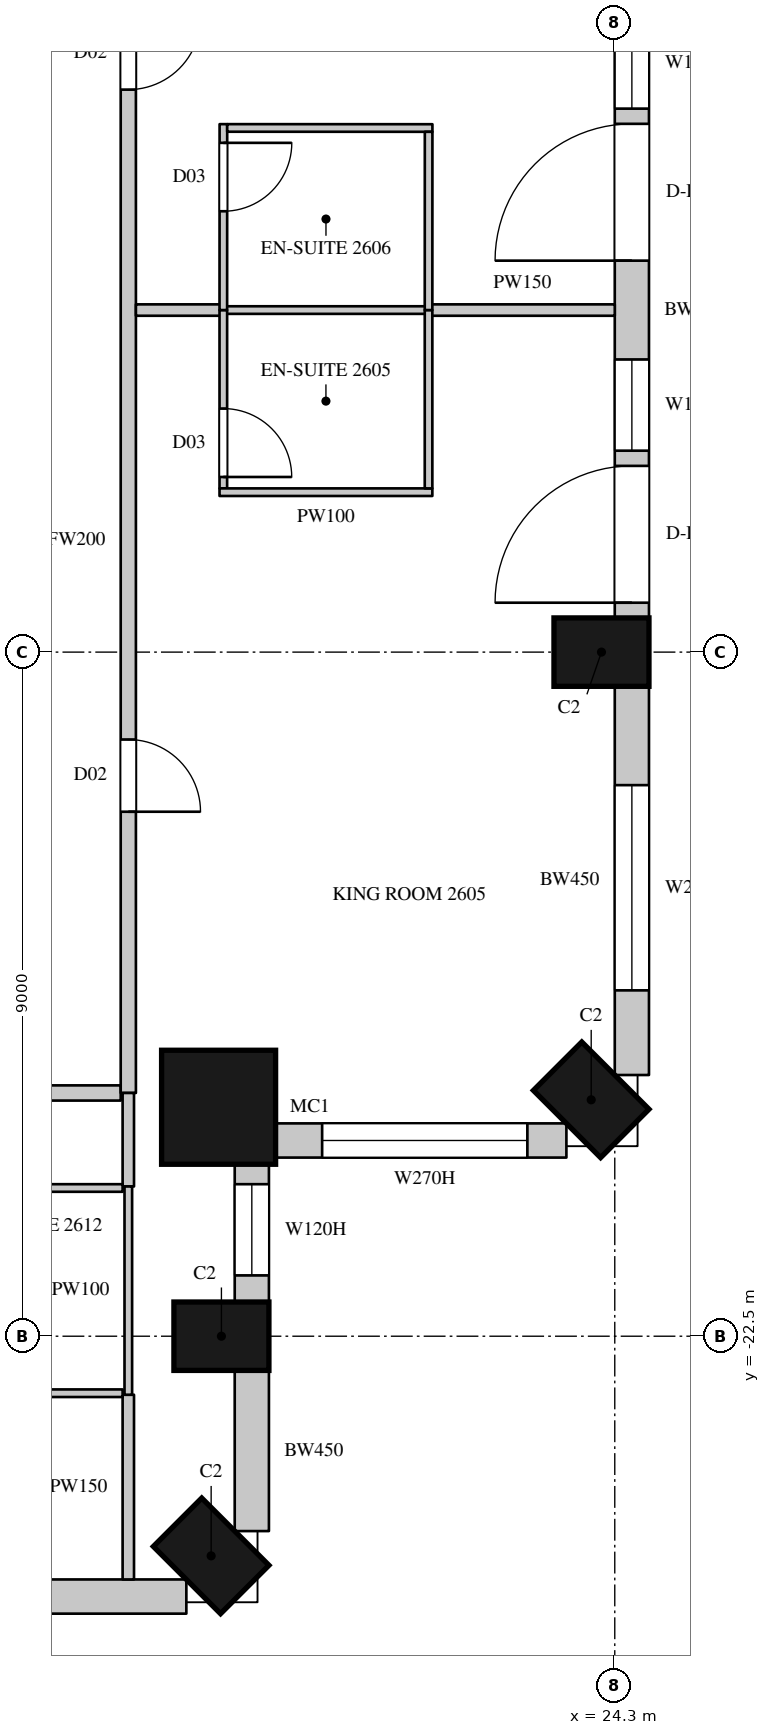
"""IFC4 building model, lengths in metres.
Left out: names, types, materials, properties, quantities, classifications, styles, units other than length and angle.
Written with IfcOpenShell. Run it as: python <this file> out.ifc"""

import sys

from ifc_helpers import new_model, si_unit, direction, frame, frame_2d, origin, origin_2d, place, context, subcontext, project, spatial, rectangle, circle, extrude, element, fill, save


model = new_model("IFC4")
c1 = context("Model", 3, precision=1e-05, world=origin(), true_north=direction((0.0, 1.0)))
c2 = subcontext(c1, "Body", "Model", "MODEL_VIEW")
j1 = project(units=[si_unit("LENGTHUNIT", "METRE"), si_unit("PLANEANGLEUNIT", "RADIAN")], contexts=[c1])
p1 = place(None, origin())
s1 = spatial("IfcSite", under=j1, at=p1, CompositionType="ELEMENT")
p2 = place(p1, origin())
s2 = spatial("IfcBuilding", under=s1, at=p2, CompositionType="ELEMENT")
p3 = place(p2, frame((0.0, 0.0, 123.9)))
s3 = spatial("IfcBuildingStorey", under=s2, at=p3, CompositionType="ELEMENT", Elevation=123.9)
for number, where, z_axis, x_axis in (
    (1, (18.99, -25.39, 0.0), (0.0, 0.0, 1.0), (0.707, 0.707, 0.0)),
    (2, (19.125, -22.5, 0.0), (0.0, 0.0, 1.0), (0.0, 1.0, 0.0)),
):
    element("IfcColumn", number, at=place(p3, frame(where, z_axis=z_axis, x_axis=x_axis)), inside=s3, PredefinedType="COLUMN", context=c2, shape_type="SweptSolid", body=[
        extrude(rectangle(XDim=0.9, YDim=1.25, at=origin_2d()), origin(), (0.0, 0.0, 1.0), 3.6),
    ])
p4 = place(p3, frame((19.088, -19.488, 0.0), z_axis=(0.0, 0.0, 1.0), x_axis=(1.0, 0.0, 0.0)))
e3 = element("IfcColumn", 3, at=p4, inside=s3, PredefinedType="COLUMN", context=c2, shape_type="SweptSolid", body=[
    extrude(circle(Radius=0.75, at=origin_2d()), origin(), (0.0, 0.0, 1.0), 3.6),
])
for number, where, z_axis, x_axis in (
    (4, (23.99, -19.39, 0.0), (0.0, 0.0, 1.0), (0.707, 0.707, 0.0)),
    (5, (24.125, -13.5, 0.0), (0.0, 0.0, 1.0), (0.0, 1.0, 0.0)),
):
    element("IfcColumn", number, at=place(p3, frame(where, z_axis=z_axis, x_axis=x_axis)), inside=s3, PredefinedType="COLUMN", context=c2, shape_type="SweptSolid", body=[
        extrude(rectangle(XDim=0.9, YDim=1.25, at=origin_2d()), origin(), (0.0, 0.0, 1.0), 3.6),
    ])
p5 = place(p3, frame((15.75, -25.925, 0.0), z_axis=(0.0, 0.0, 1.0), x_axis=(1.0, 0.0, 0.0)))
e6 = element("IfcWall", 6, at=p5, inside=s3, PredefinedType="SOLIDWALL", context=c2, shape_type="SweptSolid", body=[
    extrude(rectangle(XDim=2.914, YDim=0.45, at=frame_2d((1.457, 0.0))), origin(), (0.0, 0.0, 1.0), 3.3),
])
p6 = place(p3, frame((19.525, -25.064, 0.0), z_axis=(0.0, 0.0, 1.0), x_axis=(0.0, 1.0, 0.0)))
e7 = element("IfcWall", 7, at=p6, inside=s3, PredefinedType="SOLIDWALL", context=c2, shape_type="SweptSolid", body=[
    extrude(rectangle(XDim=2.114, YDim=0.45, at=frame_2d((1.057, 0.0))), origin(), (0.0, 0.0, 1.0), 3.3),
])
p7 = place(p3, frame((19.525, -22.05, 0.0), z_axis=(0.0, 0.0, 1.0), x_axis=(0.0, 1.0, 0.0)))
e8 = element("IfcWall", 8, at=p7, inside=s3, PredefinedType="SOLIDWALL", context=c2, shape_type="SweptSolid", body=[
    extrude(rectangle(XDim=1.843, YDim=0.45, at=frame_2d((0.921, 0.0))), origin(), (0.0, 0.0, 1.0), 3.3),
])
p8 = place(p7, frame((0.35, 0.0, 1.05)))
e9 = element("IfcOpeningElement", 9, at=p8, cuts=e8, PredefinedType="OPENING", context=c2, shape_type="SweptSolid", body=[
    extrude(rectangle(XDim=1.2, YDim=2.0, at=frame_2d((0.6, 1.0))), frame((0.0, 0.235, 0.0), z_axis=(0.0, -1.0, 0.0), x_axis=(1.0, 0.0, 0.0)), (0.0, 0.0, 1.0), 0.47),
])
p9 = place(p3, frame((19.807, -19.925, 0.0), z_axis=(0.0, 0.0, 1.0), x_axis=(1.0, 0.0, 0.0)))
e10 = element("IfcWall", 10, at=p9, inside=s3, PredefinedType="SOLIDWALL", context=c2, shape_type="SweptSolid", body=[
    extrude(rectangle(XDim=3.857, YDim=0.45, at=frame_2d((1.928, 0.0))), origin(), (0.0, 0.0, 1.0), 3.3),
])
p10 = place(p9, frame((0.643, 0.0, 1.05)))
e11 = element("IfcOpeningElement", 11, at=p10, cuts=e10, PredefinedType="OPENING", context=c2, shape_type="SweptSolid", body=[
    extrude(rectangle(XDim=2.7, YDim=2.0, at=frame_2d((1.35, 1.0))), frame((0.0, 0.235, 0.0), z_axis=(0.0, -1.0, 0.0), x_axis=(1.0, 0.0, 0.0)), (0.0, 0.0, 1.0), 0.47),
])
p11 = place(p3, frame((24.525, -19.064, 0.0), z_axis=(0.0, 0.0, 1.0), x_axis=(0.0, 1.0, 0.0)))
e12 = element("IfcWall", 12, at=p11, inside=s3, PredefinedType="SOLIDWALL", context=c2, shape_type="SweptSolid", body=[
    extrude(rectangle(XDim=5.114, YDim=0.45, at=frame_2d((2.557, 0.0))), origin(), (0.0, 0.0, 1.0), 3.3),
])
p12 = place(p11, frame((1.114, 0.0, 1.05)))
e13 = element("IfcOpeningElement", 13, at=p12, cuts=e12, PredefinedType="OPENING", context=c2, shape_type="SweptSolid", body=[
    extrude(rectangle(XDim=2.7, YDim=2.0, at=frame_2d((1.35, 1.0))), frame((0.0, 0.235, 0.0), z_axis=(0.0, -1.0, 0.0), x_axis=(1.0, 0.0, 0.0)), (0.0, 0.0, 1.0), 0.47),
])
p13 = place(p3, frame((24.525, -13.05, 0.0), z_axis=(0.0, 0.0, 1.0), x_axis=(0.0, 1.0, 0.0)))
e14 = element("IfcWall", 14, at=p13, inside=s3, PredefinedType="SOLIDWALL", context=c2, shape_type="SweptSolid", body=[
    extrude(rectangle(XDim=8.1, YDim=0.45, at=frame_2d((4.05, 0.0))), origin(), (0.0, 0.0, 1.0), 3.3),
])
p14 = place(p13, frame((0.2, 0.0, 0.0)))
e15 = element("IfcOpeningElement", 15, at=p14, cuts=e14, PredefinedType="OPENING", context=c2, shape_type="SweptSolid", body=[
    extrude(rectangle(XDim=1.8, YDim=2.4, at=frame_2d((0.9, 1.2))), frame((0.0, 0.235, 0.0), z_axis=(0.0, -1.0, 0.0), x_axis=(1.0, 0.0, 0.0)), (0.0, 0.0, 1.0), 0.47),
])
p15 = place(p13, frame((2.2, 0.0, 1.05)))
e16 = element("IfcOpeningElement", 16, at=p15, cuts=e14, PredefinedType="OPENING", context=c2, shape_type="SweptSolid", body=[
    extrude(rectangle(XDim=1.2, YDim=2.0, at=frame_2d((0.6, 1.0))), frame((0.0, 0.235, 0.0), z_axis=(0.0, -1.0, 0.0), x_axis=(1.0, 0.0, 0.0)), (0.0, 0.0, 1.0), 0.47),
])
p16 = place(p13, frame((4.7, 0.0, 0.0)))
e17 = element("IfcOpeningElement", 17, at=p16, cuts=e14, PredefinedType="OPENING", context=c2, shape_type="SweptSolid", body=[
    extrude(rectangle(XDim=1.8, YDim=2.4, at=frame_2d((0.9, 1.2))), frame((0.0, 0.235, 0.0), z_axis=(0.0, -1.0, 0.0), x_axis=(1.0, 0.0, 0.0)), (0.0, 0.0, 1.0), 0.47),
])
p17 = place(p13, frame((6.7, 0.0, 1.05)))
e18 = element("IfcOpeningElement", 18, at=p17, cuts=e14, PredefinedType="OPENING", context=c2, shape_type="SweptSolid", body=[
    extrude(rectangle(XDim=1.2, YDim=2.0, at=frame_2d((0.6, 1.0))), frame((0.0, 0.235, 0.0), z_axis=(0.0, -1.0, 0.0), x_axis=(1.0, 0.0, 0.0)), (0.0, 0.0, 1.0), 0.47),
])
p18 = place(p3, frame((-20.8, -19.3, 0.0), z_axis=(0.0, 0.0, 1.0), x_axis=(1.0, 0.0, 0.0)))
e19 = element("IfcWall", 19, at=p18, inside=s3, PredefinedType="PARTITIONING", context=c2, shape_type="SweptSolid", body=[
    extrude(rectangle(XDim=38.6, YDim=0.2, at=frame_2d((19.3, 0.0))), origin(), (0.0, 0.0, 1.0), 3.3),
])
p19 = place(p18, frame((11.2, 0.0, 0.0)))
e20 = element("IfcOpeningElement", 20, at=p19, cuts=e19, PredefinedType="OPENING", context=c2, shape_type="SweptSolid", body=[
    extrude(rectangle(XDim=0.95, YDim=2.2, at=frame_2d((0.475, 1.1))), frame((0.0, 0.11, 0.0), z_axis=(0.0, -1.0, 0.0), x_axis=(1.0, 0.0, 0.0)), (0.0, 0.0, 1.0), 0.22),
])
p20 = place(p18, frame((15.05, 0.0, 0.0)))
e21 = element("IfcOpeningElement", 21, at=p20, cuts=e19, PredefinedType="OPENING", context=c2, shape_type="SweptSolid", body=[
    extrude(rectangle(XDim=0.95, YDim=2.2, at=frame_2d((0.475, 1.1))), frame((0.0, 0.11, 0.0), z_axis=(0.0, -1.0, 0.0), x_axis=(1.0, 0.0, 0.0)), (0.0, 0.0, 1.0), 0.22),
])
p21 = place(p18, frame((29.2, 0.0, 0.0)))
e22 = element("IfcOpeningElement", 22, at=p21, cuts=e19, PredefinedType="OPENING", context=c2, shape_type="SweptSolid", body=[
    extrude(rectangle(XDim=0.95, YDim=2.2, at=frame_2d((0.475, 1.1))), frame((0.0, 0.11, 0.0), z_axis=(0.0, -1.0, 0.0), x_axis=(1.0, 0.0, 0.0)), (0.0, 0.0, 1.0), 0.22),
])
p22 = place(p18, frame((33.05, 0.0, 0.0)))
e23 = element("IfcOpeningElement", 23, at=p22, cuts=e19, PredefinedType="OPENING", context=c2, shape_type="SweptSolid", body=[
    extrude(rectangle(XDim=0.95, YDim=2.2, at=frame_2d((0.475, 1.1))), frame((0.0, 0.11, 0.0), z_axis=(0.0, -1.0, 0.0), x_axis=(1.0, 0.0, 0.0)), (0.0, 0.0, 1.0), 0.22),
])
p23 = place(p3, frame((17.9, -19.3, 0.0), z_axis=(0.0, 0.0, 1.0), x_axis=(0.0, 1.0, 0.0)))
e24 = element("IfcWall", 24, at=p23, inside=s3, PredefinedType="PARTITIONING", context=c2, shape_type="SweptSolid", body=[
    extrude(rectangle(XDim=14.55, YDim=0.2, at=frame_2d((7.275, 0.0))), origin(), (0.0, 0.0, 1.0), 3.3),
])
p24 = place(p23, frame((3.7, 0.0, 0.0)))
e25 = element("IfcOpeningElement", 25, at=p24, cuts=e24, PredefinedType="OPENING", context=c2, shape_type="SweptSolid", body=[
    extrude(rectangle(XDim=0.95, YDim=2.2, at=frame_2d((0.475, 1.1))), frame((0.0, 0.11, 0.0), z_axis=(0.0, -1.0, 0.0), x_axis=(1.0, 0.0, 0.0)), (0.0, 0.0, 1.0), 0.22),
])
p25 = place(p23, frame((13.2, 0.0, 0.0)))
e26 = element("IfcOpeningElement", 26, at=p25, cuts=e24, PredefinedType="OPENING", context=c2, shape_type="SweptSolid", body=[
    extrude(rectangle(XDim=0.95, YDim=2.2, at=frame_2d((0.475, 1.1))), frame((0.0, 0.11, 0.0), z_axis=(0.0, -1.0, 0.0), x_axis=(1.0, 0.0, 0.0)), (0.0, 0.0, 1.0), 0.22),
])
p26 = place(p3, frame((17.9, -25.7, 0.0), z_axis=(0.0, 0.0, 1.0), x_axis=(0.0, 1.0, 0.0)))
e27 = element("IfcWall", 27, at=p26, inside=s3, PredefinedType="PARTITIONING", context=c2, shape_type="SweptSolid", body=[
    extrude(rectangle(XDim=2.43, YDim=0.15, at=frame_2d((1.215, 0.0))), origin(), (0.0, 0.0, 1.0), 3.3),
])
p27 = place(p3, frame((17.9, -20.53, 0.0), z_axis=(0.0, 0.0, 1.0), x_axis=(0.0, 1.0, 0.0)))
e28 = element("IfcWall", 28, at=p27, inside=s3, PredefinedType="PARTITIONING", context=c2, shape_type="SweptSolid", body=[
    extrude(rectangle(XDim=1.23, YDim=0.15, at=frame_2d((0.615, 0.0))), origin(), (0.0, 0.0, 1.0), 3.3),
])
p28 = place(p3, frame((18.0, -9.0, 0.0), z_axis=(0.0, 0.0, 1.0), x_axis=(1.0, 0.0, 0.0)))
e29 = element("IfcWall", 29, at=p28, inside=s3, PredefinedType="PARTITIONING", context=c2, shape_type="SweptSolid", body=[
    extrude(rectangle(XDim=1.13, YDim=0.15, at=frame_2d((0.565, 0.0))), origin(), (0.0, 0.0, 1.0), 2.65),
])
p29 = place(p3, frame((21.87, -9.0, 0.0), z_axis=(0.0, 0.0, 1.0), x_axis=(1.0, 0.0, 0.0)))
e30 = element("IfcWall", 30, at=p29, inside=s3, PredefinedType="PARTITIONING", context=c2, shape_type="SweptSolid", body=[
    extrude(rectangle(XDim=2.43, YDim=0.15, at=frame_2d((1.215, 0.0))), origin(), (0.0, 0.0, 1.0), 2.65),
])
for number, where, z_axis, x_axis in (
    (31, (15.45, -23.25, 0.0), (0.0, 0.0, 1.0), (1.0, 0.0, 0.0)),
    (32, (15.45, -20.55, 0.0), (0.0, 0.0, 1.0), (1.0, 0.0, 0.0)),
):
    element("IfcWall", number, at=place(p3, frame(where, z_axis=z_axis, x_axis=x_axis)), inside=s3, PredefinedType="PARTITIONING", context=c2, shape_type="SweptSolid", body=[
        extrude(rectangle(XDim=2.375, YDim=0.1, at=frame_2d((1.188, 0.0))), origin(), (0.0, 0.0, 1.0), 3.3),
    ])
p30 = place(p3, frame((17.9, -23.27, 0.0), z_axis=(0.0, 0.0, 1.0), x_axis=(0.0, 1.0, 0.0)))
e33 = element("IfcWall", 33, at=p30, inside=s3, PredefinedType="PARTITIONING", context=c2, shape_type="SweptSolid", body=[
    extrude(rectangle(XDim=2.74, YDim=0.1, at=frame_2d((1.37, 0.0))), origin(), (0.0, 0.0, 1.0), 3.3),
])
p31 = place(p3, frame((19.13, -9.0, 0.0), z_axis=(0.0, 0.0, 1.0), x_axis=(1.0, 0.0, 0.0)))
e34 = element("IfcWall", 34, at=p31, inside=s3, PredefinedType="PARTITIONING", context=c2, shape_type="SweptSolid", body=[
    extrude(rectangle(XDim=2.74, YDim=0.1, at=frame_2d((1.37, 0.0))), origin(), (0.0, 0.0, 1.0), 2.65),
])
p32 = place(p3, frame((19.15, -11.346, 0.0), z_axis=(0.0, 0.0, 1.0), x_axis=(0.0, 1.0, 0.0)))
e35 = element("IfcWall", 35, at=p32, inside=s3, PredefinedType="PARTITIONING", context=c2, shape_type="SweptSolid", body=[
    extrude(rectangle(XDim=2.346, YDim=0.1, at=frame_2d((1.173, 0.0))), origin(), (0.0, 0.0, 1.0), 3.3),
])
p33 = place(p32, frame((0.15, 0.0, 0.0)))
e36 = element("IfcOpeningElement", 36, at=p33, cuts=e35, PredefinedType="OPENING", context=c2, shape_type="SweptSolid", body=[
    extrude(rectangle(XDim=0.9, YDim=2.2, at=frame_2d((0.45, 1.1))), frame((0.0, 0.06, 0.0), z_axis=(0.0, -1.0, 0.0), x_axis=(1.0, 0.0, 0.0)), (0.0, 0.0, 1.0), 0.12),
])
p34 = place(p3, frame((19.1, -11.396, 0.0), z_axis=(0.0, 0.0, 1.0), x_axis=(1.0, 0.0, 0.0)))
e37 = element("IfcWall", 37, at=p34, inside=s3, PredefinedType="PARTITIONING", context=c2, shape_type="SweptSolid", body=[
    extrude(rectangle(XDim=2.8, YDim=0.1, at=frame_2d((1.4, 0.0))), origin(), (0.0, 0.0, 1.0), 3.3),
])
p35 = place(p3, frame((19.15, -9.0, 0.0), z_axis=(0.0, 0.0, 1.0), x_axis=(0.000499051739, 0.999999875474, 0.0)))
e38 = element("IfcWall", 38, at=p35, inside=s3, PredefinedType="PARTITIONING", context=c2, shape_type="SweptSolid", body=[
    extrude(rectangle(XDim=2.446, YDim=0.1, at=frame_2d((1.223, 0.0))), origin(), (0.0, 0.0, 1.0), 3.3),
])
p36 = place(p35, frame((1.3, 0.0, 0.0)))
e39 = element("IfcOpeningElement", 39, at=p36, cuts=e38, PredefinedType="OPENING", context=c2, shape_type="SweptSolid", body=[
    extrude(rectangle(XDim=0.9, YDim=2.2, at=frame_2d((0.45, 1.1))), frame((0.0, 0.06, 0.0), z_axis=(0.0, -1.0, 0.0), x_axis=(1.0, 0.0, 0.0)), (0.0, 0.0, 1.0), 0.12),
])
p37 = place(p3, frame((19.201, -6.604, 0.0), z_axis=(0.0, 0.0, 1.0), x_axis=(0.999999934588, -0.000361696332, 0.0)))
e40 = element("IfcWall", 40, at=p37, inside=s3, PredefinedType="PARTITIONING", context=c2, shape_type="SweptSolid", body=[
    extrude(rectangle(XDim=2.7, YDim=0.1, at=frame_2d((1.35, 0.0))), origin(), (0.0, 0.0, 1.0), 3.3),
])
p38 = place(p3, frame((21.85, -11.346, 0.0), z_axis=(0.0, 0.0, 1.0), x_axis=(0.0, 1.0, 0.0)))
e41 = element("IfcWall", 41, at=p38, inside=s3, PredefinedType="PARTITIONING", context=c2, shape_type="SweptSolid", body=[
    extrude(rectangle(XDim=2.346, YDim=0.1, at=frame_2d((1.173, 0.0))), origin(), (0.0, 0.0, 1.0), 3.3),
])
p39 = place(p3, frame((21.85, -9.0, 0.0), z_axis=(0.0, 0.0, 1.0), x_axis=(0.00041644973, 0.999999913285, 0.0)))
e42 = element("IfcWall", 42, at=p39, inside=s3, PredefinedType="PARTITIONING", context=c2, shape_type="SweptSolid", body=[
    extrude(rectangle(XDim=2.345, YDim=0.1, at=frame_2d((1.172, 0.0))), origin(), (0.0, 0.0, 1.0), 3.3),
])
p40 = place(p8, origin())
e43 = element("IfcWindow", 43, at=p40, inside=s3, PartitioningType="SINGLE_PANEL", PredefinedType="WINDOW", context=c2, shape_type="SweptSolid", body=[
    extrude(rectangle(XDim=1.2, YDim=2.0, at=frame_2d((0.6, 1.0))), frame((0.0, 0.135, 0.0), z_axis=(0.0, -1.0, 0.0), x_axis=(1.0, 0.0, 0.0)), (0.0, 0.0, 1.0), 0.06),
])
fill(e9, e43)
p41 = place(p10, origin())
e44 = element("IfcWindow", 44, at=p41, inside=s3, PartitioningType="SINGLE_PANEL", PredefinedType="WINDOW", context=c2, shape_type="SweptSolid", body=[
    extrude(rectangle(XDim=2.7, YDim=2.0, at=frame_2d((1.35, 1.0))), frame((0.0, 0.135, 0.0), z_axis=(0.0, -1.0, 0.0), x_axis=(1.0, 0.0, 0.0)), (0.0, 0.0, 1.0), 0.06),
])
fill(e11, e44)
p42 = place(p12, origin())
e45 = element("IfcWindow", 45, at=p42, inside=s3, PartitioningType="SINGLE_PANEL", PredefinedType="WINDOW", context=c2, shape_type="SweptSolid", body=[
    extrude(rectangle(XDim=2.7, YDim=2.0, at=frame_2d((1.35, 1.0))), frame((0.0, 0.135, 0.0), z_axis=(0.0, -1.0, 0.0), x_axis=(1.0, 0.0, 0.0)), (0.0, 0.0, 1.0), 0.06),
])
fill(e13, e45)
p43 = place(p14, origin())
e46 = element("IfcDoor", 46, at=p43, inside=s3, OperationType="SLIDING_TO_LEFT", PredefinedType="DOOR", context=c2, shape_type="SweptSolid", body=[
    extrude(rectangle(XDim=1.8, YDim=2.4, at=frame_2d((0.9, 1.2))), frame((0.0, 0.13, 0.0), z_axis=(0.0, -1.0, 0.0), x_axis=(1.0, 0.0, 0.0)), (0.0, 0.0, 1.0), 0.05),
])
fill(e15, e46)
p44 = place(p15, origin())
e47 = element("IfcWindow", 47, at=p44, inside=s3, PartitioningType="SINGLE_PANEL", PredefinedType="WINDOW", context=c2, shape_type="SweptSolid", body=[
    extrude(rectangle(XDim=1.2, YDim=2.0, at=frame_2d((0.6, 1.0))), frame((0.0, 0.135, 0.0), z_axis=(0.0, -1.0, 0.0), x_axis=(1.0, 0.0, 0.0)), (0.0, 0.0, 1.0), 0.06),
])
fill(e16, e47)
p45 = place(p16, origin())
e48 = element("IfcDoor", 48, at=p45, inside=s3, OperationType="SLIDING_TO_LEFT", PredefinedType="DOOR", context=c2, shape_type="SweptSolid", body=[
    extrude(rectangle(XDim=1.8, YDim=2.4, at=frame_2d((0.9, 1.2))), frame((0.0, 0.13, 0.0), z_axis=(0.0, -1.0, 0.0), x_axis=(1.0, 0.0, 0.0)), (0.0, 0.0, 1.0), 0.05),
])
fill(e17, e48)
p46 = place(p17, origin())
e49 = element("IfcWindow", 49, at=p46, inside=s3, PartitioningType="SINGLE_PANEL", PredefinedType="WINDOW", context=c2, shape_type="SweptSolid", body=[
    extrude(rectangle(XDim=1.2, YDim=2.0, at=frame_2d((0.6, 1.0))), frame((0.0, 0.135, 0.0), z_axis=(0.0, -1.0, 0.0), x_axis=(1.0, 0.0, 0.0)), (0.0, 0.0, 1.0), 0.06),
])
fill(e18, e49)
p47 = place(p24, origin())
e50 = element("IfcDoor", 50, at=p47, inside=s3, OperationType="SINGLE_SWING_RIGHT", PredefinedType="DOOR", context=c2, shape_type="SweptSolid", body=[
    extrude(rectangle(XDim=0.95, YDim=2.2, at=frame_2d((0.475, 1.1))), frame((0.0, 0.025, 0.0), z_axis=(0.0, -1.0, 0.0), x_axis=(1.0, 0.0, 0.0)), (0.0, 0.0, 1.0), 0.05),
])
fill(e25, e50)
p48 = place(p33, origin())
e51 = element("IfcDoor", 51, at=p48, inside=s3, OperationType="SINGLE_SWING_RIGHT", PredefinedType="DOOR", context=c2, shape_type="SweptSolid", body=[
    extrude(rectangle(XDim=0.9, YDim=2.2, at=frame_2d((0.45, 1.1))), frame((0.0, 0.025, 0.0), z_axis=(0.0, -1.0, 0.0), x_axis=(1.0, 0.0, 0.0)), (0.0, 0.0, 1.0), 0.05),
])
fill(e36, e51)
p49 = place(p25, origin())
e52 = element("IfcDoor", 52, at=p49, inside=s3, OperationType="SINGLE_SWING_LEFT", PredefinedType="DOOR", context=c2, shape_type="SweptSolid", body=[
    extrude(rectangle(XDim=0.95, YDim=2.2, at=frame_2d((0.475, 1.1))), frame((0.0, 0.025, 0.0), z_axis=(0.0, -1.0, 0.0), x_axis=(1.0, 0.0, 0.0)), (0.0, 0.0, 1.0), 0.05),
])
fill(e26, e52)
p50 = place(p36, origin())
e53 = element("IfcDoor", 53, at=p50, inside=s3, OperationType="SINGLE_SWING_LEFT", PredefinedType="DOOR", context=c2, shape_type="SweptSolid", body=[
    extrude(rectangle(XDim=0.9, YDim=2.2, at=frame_2d((0.45, 1.1))), frame((0.0, 0.025, 0.0), z_axis=(0.0, -1.0, 0.0), x_axis=(1.0, 0.0, 0.0)), (0.0, 0.0, 1.0), 0.05),
])
fill(e39, e53)
save(model, sys.argv[1])
